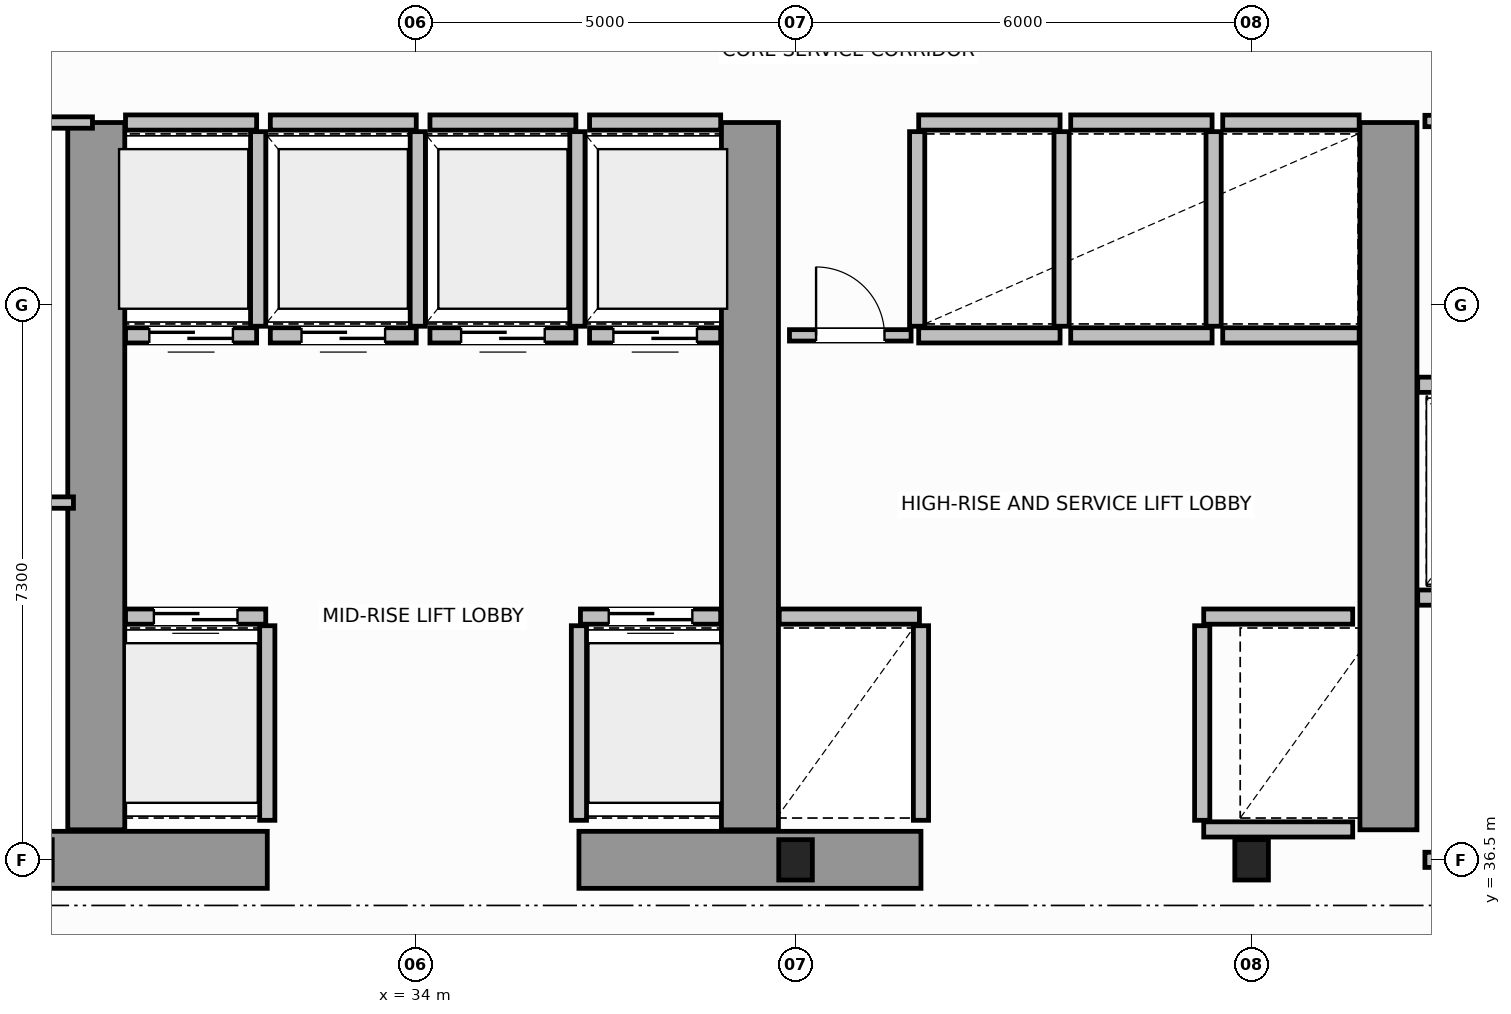
"""IFC4 building model, lengths in metres.
Left out: names, types, materials, properties, quantities, classifications, styles, units other than length and angle.
Written with IfcOpenShell. Run it as: python <this file> out.ifc"""

import sys

from ifc_helpers import new_model, si_unit, direction, frame, frame_2d, origin, origin_2d, place, context, subcontext, project, spatial, rectangle, i_section, extrude, source, transform, mapped, element, fill, save


model = new_model("IFC4")
c1 = context("Model", 3, precision=1e-05, world=origin(), true_north=direction((0.0, 1.0)))
c2 = subcontext(c1, "Body", "Model", "MODEL_VIEW")
j1 = project(units=[si_unit("LENGTHUNIT", "METRE"), si_unit("PLANEANGLEUNIT", "RADIAN")], contexts=[c1])
p1 = place(None, origin())
s1 = spatial("IfcSite", under=j1, at=p1, CompositionType="ELEMENT")
p2 = place(p1, origin())
s2 = spatial("IfcBuilding", under=s1, at=p2, CompositionType="ELEMENT")
p3 = place(p2, frame((0.0, 0.0, 118.6)))
s3 = spatial("IfcBuildingStorey", under=s2, at=p3, CompositionType="ELEMENT", Elevation=118.6)
m1 = source(origin(), c2, "Body", "SweptSolid", [
    extrude(i_section(OverallWidth=0.442, OverallDepth=0.531, WebThickness=0.065, FlangeThickness=0.076, FilletRadius=0.015, at=origin_2d()), origin(), (0.0, 0.0, 1.0), 3.8),
])
for number, where, z_axis, x_axis in (
    (1, (39.0, 36.5, 0.0), (0.0, 0.0, 1.0), (1.0, 0.0, 0.0)),
    (2, (45.0, 36.5, 0.0), (0.0, 0.0, 1.0), (1.0, 0.0, 0.0)),
):
    element("IfcColumn", number, at=place(p3, frame(where, z_axis=z_axis, x_axis=x_axis)), inside=s3, PredefinedType="COLUMN", context=c2, shape_type="MappedRepresentation", body=[
        mapped(m1, transform((0.0, 0.0, 0.0), scale=1.0)),
    ])
for number, where, z_axis, x_axis in (
    (3, (27.55, 36.5, 0.0), (0.0, 0.0, 1.0), (1.0, 0.0, 0.0)),
    (4, (36.15, 36.5, 0.0), (0.0, 0.0, 1.0), (1.0, 0.0, 0.0)),
):
    element("IfcWall", number, at=place(p3, frame(where, z_axis=z_axis, x_axis=x_axis)), inside=s3, PredefinedType="SHEAR", context=c2, shape_type="SweptSolid", body=[
        extrude(rectangle(XDim=4.5, YDim=0.75, at=frame_2d((2.25, 0.0))), origin(), (0.0, 0.0, 1.0), 3.8),
    ])
for number, where, z_axis, x_axis in (
    (5, (29.8, 36.895, 0.0), (0.0, 0.0, 1.0), (0.0, 1.0, 0.0)),
    (6, (38.4, 36.895, 0.0), (0.0, 0.0, 1.0), (0.0, 1.0, 0.0)),
    (7, (46.8, 36.895, 0.0), (0.0, 0.0, 1.0), (0.0, 1.0, 0.0)),
):
    element("IfcWall", number, at=place(p3, frame(where, z_axis=z_axis, x_axis=x_axis)), inside=s3, PredefinedType="SHEAR", context=c2, shape_type="SweptSolid", body=[
        extrude(rectangle(XDim=9.305, YDim=0.75, at=frame_2d((4.652, 0.0))), origin(), (0.0, 0.0, 1.0), 3.8),
    ])
p4 = place(p3, frame((47.28, 36.5, 0.0), z_axis=(0.0, 0.0, 1.0), x_axis=(1.0, 0.0, 0.0)))
e8 = element("IfcWall", 8, at=p4, inside=s3, PredefinedType="SOLIDWALL", context=c2, shape_type="SweptSolid", body=[
    extrude(rectangle(XDim=2.47, YDim=0.2, at=frame_2d((1.235, 0.0))), origin(), (0.0, 0.0, 1.0), 2.37),
])
p5 = place(p4, frame((0.65, 0.0, 0.0)))
e9 = element("IfcOpeningElement", 9, at=p5, cuts=e8, PredefinedType="OPENING", context=c2, shape_type="SweptSolid", body=[
    extrude(rectangle(XDim=1.1, YDim=2.15, at=frame_2d((0.55, 1.075))), frame((0.0, 0.11, 0.0), z_axis=(0.0, -1.0, 0.0), x_axis=(1.0, 0.0, 0.0)), (0.0, 0.0, 1.0), 0.22),
])
p6 = place(p3, frame((30.185, 39.7, 0.0), z_axis=(0.0, 0.0, 1.0), x_axis=(1.0, 0.0, 0.0)))
e10 = element("IfcWall", 10, at=p6, inside=s3, PredefinedType="SOLIDWALL", context=c2, shape_type="SweptSolid", body=[
    extrude(rectangle(XDim=1.845, YDim=0.2, at=frame_2d((0.922, 0.0))), origin(), (0.0, 0.0, 1.0), 3.58),
])
p7 = place(p6, frame((0.373, 0.0, 0.0)))
e11 = element("IfcOpeningElement", 11, at=p7, cuts=e10, PredefinedType="OPENING", context=c2, shape_type="SweptSolid", body=[
    extrude(rectangle(XDim=1.1, YDim=2.15, at=frame_2d((0.55, 1.075))), frame((0.0, 0.11, 0.0), z_axis=(0.0, -1.0, 0.0), x_axis=(1.0, 0.0, 0.0)), (0.0, 0.0, 1.0), 0.22),
])
p8 = place(p3, frame((32.05, 37.02, 0.0), z_axis=(0.0, 0.0, 1.0), x_axis=(0.0, 1.0, 0.0)))
e12 = element("IfcWall", 12, at=p8, inside=s3, PredefinedType="SOLIDWALL", context=c2, shape_type="SweptSolid", body=[
    extrude(rectangle(XDim=2.56, YDim=0.2, at=frame_2d((1.28, 0.0))), origin(), (0.0, 0.0, 1.0), 3.58),
])
p9 = place(p3, frame((36.17, 39.7, 0.0), z_axis=(0.0, 0.0, 1.0), x_axis=(1.0, 0.0, 0.0)))
e13 = element("IfcWall", 13, at=p9, inside=s3, PredefinedType="SOLIDWALL", context=c2, shape_type="SweptSolid", body=[
    extrude(rectangle(XDim=1.845, YDim=0.2, at=frame_2d((0.922, 0.0))), origin(), (0.0, 0.0, 1.0), 3.58),
])
p10 = place(p9, frame((0.372, 0.0, 0.0)))
e14 = element("IfcOpeningElement", 14, at=p10, cuts=e13, PredefinedType="OPENING", context=c2, shape_type="SweptSolid", body=[
    extrude(rectangle(XDim=1.1, YDim=2.15, at=frame_2d((0.55, 1.075))), frame((0.0, 0.11, 0.0), z_axis=(0.0, -1.0, 0.0), x_axis=(1.0, 0.0, 0.0)), (0.0, 0.0, 1.0), 0.22),
])
p11 = place(p3, frame((36.15, 37.02, 0.0), z_axis=(0.0, 0.0, 1.0), x_axis=(0.0, 1.0, 0.0)))
e15 = element("IfcWall", 15, at=p11, inside=s3, PredefinedType="SOLIDWALL", context=c2, shape_type="SweptSolid", body=[
    extrude(rectangle(XDim=2.56, YDim=0.2, at=frame_2d((1.28, 0.0))), origin(), (0.0, 0.0, 1.0), 3.58),
])
p12 = place(p3, frame((30.185, 43.4, 0.0), z_axis=(0.0, 0.0, 1.0), x_axis=(1.0, 0.0, 0.0)))
e16 = element("IfcWall", 16, at=p12, inside=s3, PredefinedType="SOLIDWALL", context=c2, shape_type="SweptSolid", body=[
    extrude(rectangle(XDim=1.725, YDim=0.2, at=frame_2d((0.862, 0.0))), origin(), (0.0, 0.0, 1.0), 3.58),
])
p13 = place(p12, frame((0.313, 0.0, 0.0)))
e17 = element("IfcOpeningElement", 17, at=p13, cuts=e16, PredefinedType="OPENING", context=c2, shape_type="SweptSolid", body=[
    extrude(rectangle(XDim=1.1, YDim=2.15, at=frame_2d((0.55, 1.075))), frame((0.0, 0.11, 0.0), z_axis=(0.0, -1.0, 0.0), x_axis=(1.0, 0.0, 0.0)), (0.0, 0.0, 1.0), 0.22),
])
p14 = place(p3, frame((30.185, 46.2, 0.0), z_axis=(0.0, 0.0, 1.0), x_axis=(1.0, 0.0, 0.0)))
e18 = element("IfcWall", 18, at=p14, inside=s3, PredefinedType="SOLIDWALL", context=c2, shape_type="SweptSolid", body=[
    extrude(rectangle(XDim=1.725, YDim=0.2, at=frame_2d((0.862, 0.0))), origin(), (0.0, 0.0, 1.0), 3.58),
])
p15 = place(p3, frame((31.93, 43.52, 0.0), z_axis=(0.0, 0.0, 1.0), x_axis=(0.0, 1.0, 0.0)))
e19 = element("IfcWall", 19, at=p15, inside=s3, PredefinedType="SOLIDWALL", context=c2, shape_type="SweptSolid", body=[
    extrude(rectangle(XDim=2.56, YDim=0.2, at=frame_2d((1.28, 0.0))), origin(), (0.0, 0.0, 1.0), 3.58),
])
p16 = place(p3, frame((32.09, 43.4, 0.0), z_axis=(0.0, 0.0, 1.0), x_axis=(1.0, 0.0, 0.0)))
e20 = element("IfcWall", 20, at=p16, inside=s3, PredefinedType="SOLIDWALL", context=c2, shape_type="SweptSolid", body=[
    extrude(rectangle(XDim=1.92, YDim=0.2, at=frame_2d((0.96, 0.0))), origin(), (0.0, 0.0, 1.0), 3.58),
])
p17 = place(p16, frame((0.41, 0.0, 0.0)))
e21 = element("IfcOpeningElement", 21, at=p17, cuts=e20, PredefinedType="OPENING", context=c2, shape_type="SweptSolid", body=[
    extrude(rectangle(XDim=1.1, YDim=2.15, at=frame_2d((0.55, 1.075))), frame((0.0, 0.11, 0.0), z_axis=(0.0, -1.0, 0.0), x_axis=(1.0, 0.0, 0.0)), (0.0, 0.0, 1.0), 0.22),
])
p18 = place(p3, frame((32.09, 46.2, 0.0), z_axis=(0.0, 0.0, 1.0), x_axis=(1.0, 0.0, 0.0)))
e22 = element("IfcWall", 22, at=p18, inside=s3, PredefinedType="SOLIDWALL", context=c2, shape_type="SweptSolid", body=[
    extrude(rectangle(XDim=1.92, YDim=0.2, at=frame_2d((0.96, 0.0))), origin(), (0.0, 0.0, 1.0), 3.58),
])
p19 = place(p3, frame((34.03, 43.52, 0.0), z_axis=(0.0, 0.0, 1.0), x_axis=(0.0, 1.0, 0.0)))
e23 = element("IfcWall", 23, at=p19, inside=s3, PredefinedType="SOLIDWALL", context=c2, shape_type="SweptSolid", body=[
    extrude(rectangle(XDim=2.56, YDim=0.2, at=frame_2d((1.28, 0.0))), origin(), (0.0, 0.0, 1.0), 3.58),
])
p20 = place(p3, frame((34.19, 43.4, 0.0), z_axis=(0.0, 0.0, 1.0), x_axis=(1.0, 0.0, 0.0)))
e24 = element("IfcWall", 24, at=p20, inside=s3, PredefinedType="SOLIDWALL", context=c2, shape_type="SweptSolid", body=[
    extrude(rectangle(XDim=1.92, YDim=0.2, at=frame_2d((0.96, 0.0))), origin(), (0.0, 0.0, 1.0), 3.58),
])
p21 = place(p20, frame((0.41, 0.0, 0.0)))
e25 = element("IfcOpeningElement", 25, at=p21, cuts=e24, PredefinedType="OPENING", context=c2, shape_type="SweptSolid", body=[
    extrude(rectangle(XDim=1.1, YDim=2.15, at=frame_2d((0.55, 1.075))), frame((0.0, 0.11, 0.0), z_axis=(0.0, -1.0, 0.0), x_axis=(1.0, 0.0, 0.0)), (0.0, 0.0, 1.0), 0.22),
])
p22 = place(p3, frame((34.19, 46.2, 0.0), z_axis=(0.0, 0.0, 1.0), x_axis=(1.0, 0.0, 0.0)))
e26 = element("IfcWall", 26, at=p22, inside=s3, PredefinedType="SOLIDWALL", context=c2, shape_type="SweptSolid", body=[
    extrude(rectangle(XDim=1.92, YDim=0.2, at=frame_2d((0.96, 0.0))), origin(), (0.0, 0.0, 1.0), 3.58),
])
p23 = place(p3, frame((36.13, 43.52, 0.0), z_axis=(0.0, 0.0, 1.0), x_axis=(0.0, 1.0, 0.0)))
e27 = element("IfcWall", 27, at=p23, inside=s3, PredefinedType="SOLIDWALL", context=c2, shape_type="SweptSolid", body=[
    extrude(rectangle(XDim=2.56, YDim=0.2, at=frame_2d((1.28, 0.0))), origin(), (0.0, 0.0, 1.0), 3.58),
])
p24 = place(p3, frame((36.29, 43.4, 0.0), z_axis=(0.0, 0.0, 1.0), x_axis=(1.0, 0.0, 0.0)))
e28 = element("IfcWall", 28, at=p24, inside=s3, PredefinedType="SOLIDWALL", context=c2, shape_type="SweptSolid", body=[
    extrude(rectangle(XDim=1.725, YDim=0.2, at=frame_2d((0.862, 0.0))), origin(), (0.0, 0.0, 1.0), 3.58),
])
p25 = place(p24, frame((0.313, 0.0, 0.0)))
e29 = element("IfcOpeningElement", 29, at=p25, cuts=e28, PredefinedType="OPENING", context=c2, shape_type="SweptSolid", body=[
    extrude(rectangle(XDim=1.1, YDim=2.15, at=frame_2d((0.55, 1.075))), frame((0.0, 0.11, 0.0), z_axis=(0.0, -1.0, 0.0), x_axis=(1.0, 0.0, 0.0)), (0.0, 0.0, 1.0), 0.22),
])
p26 = place(p3, frame((36.29, 46.2, 0.0), z_axis=(0.0, 0.0, 1.0), x_axis=(1.0, 0.0, 0.0)))
e30 = element("IfcWall", 30, at=p26, inside=s3, PredefinedType="SOLIDWALL", context=c2, shape_type="SweptSolid", body=[
    extrude(rectangle(XDim=1.725, YDim=0.2, at=frame_2d((0.862, 0.0))), origin(), (0.0, 0.0, 1.0), 3.58),
])
p27 = place(p3, frame((38.785, 39.7, 0.0), z_axis=(0.0, 0.0, 1.0), x_axis=(1.0, 0.0, 0.0)))
e31 = element("IfcWall", 31, at=p27, inside=s3, PredefinedType="SOLIDWALL", context=c2, shape_type="SweptSolid", body=[
    extrude(rectangle(XDim=1.845, YDim=0.2, at=frame_2d((0.922, 0.0))), origin(), (0.0, 0.0, 1.0), 3.58),
])
p28 = place(p3, frame((40.65, 37.02, 0.0), z_axis=(0.0, 0.0, 1.0), x_axis=(0.0, 1.0, 0.0)))
e32 = element("IfcWall", 32, at=p28, inside=s3, PredefinedType="SOLIDWALL", context=c2, shape_type="SweptSolid", body=[
    extrude(rectangle(XDim=2.56, YDim=0.2, at=frame_2d((1.28, 0.0))), origin(), (0.0, 0.0, 1.0), 3.58),
])
p29 = place(p3, frame((44.37, 39.7, 0.0), z_axis=(0.0, 0.0, 1.0), x_axis=(1.0, 0.0, 0.0)))
e33 = element("IfcWall", 33, at=p29, inside=s3, PredefinedType="SOLIDWALL", context=c2, shape_type="SweptSolid", body=[
    extrude(rectangle(XDim=1.96, YDim=0.2, at=frame_2d((0.98, 0.0))), origin(), (0.0, 0.0, 1.0), 3.58),
])
p30 = place(p3, frame((44.37, 36.9, 0.0), z_axis=(0.0, 0.0, 1.0), x_axis=(1.0, 0.0, 0.0)))
e34 = element("IfcWall", 34, at=p30, inside=s3, PredefinedType="SOLIDWALL", context=c2, shape_type="SweptSolid", body=[
    extrude(rectangle(XDim=1.96, YDim=0.2, at=frame_2d((0.98, 0.0))), origin(), (0.0, 0.0, 1.0), 2.37),
])
p31 = place(p3, frame((44.35, 37.02, 0.0), z_axis=(0.0, 0.0, 1.0), x_axis=(0.0, 1.0, 0.0)))
e35 = element("IfcWall", 35, at=p31, inside=s3, PredefinedType="SOLIDWALL", context=c2, shape_type="SweptSolid", body=[
    extrude(rectangle(XDim=2.56, YDim=0.2, at=frame_2d((1.28, 0.0))), origin(), (0.0, 0.0, 1.0), 3.58),
])
for number, where, z_axis, x_axis in (
    (36, (40.62, 43.4, 0.0), (0.0, 0.0, 1.0), (1.0, 0.0, 0.0)),
    (37, (40.62, 46.2, 0.0), (0.0, 0.0, 1.0), (1.0, 0.0, 0.0)),
):
    element("IfcWall", number, at=place(p3, frame(where, z_axis=z_axis, x_axis=x_axis)), inside=s3, PredefinedType="SOLIDWALL", context=c2, shape_type="SweptSolid", body=[
        extrude(rectangle(XDim=1.86, YDim=0.2, at=frame_2d((0.93, 0.0))), origin(), (0.0, 0.0, 1.0), 3.58),
    ])
for number, where, z_axis, x_axis in (
    (38, (40.6, 43.52, 0.0), (0.0, 0.0, 1.0), (0.0, 1.0, 0.0)),
    (39, (42.5, 43.52, 0.0), (0.0, 0.0, 1.0), (0.0, 1.0, 0.0)),
):
    element("IfcWall", number, at=place(p3, frame(where, z_axis=z_axis, x_axis=x_axis)), inside=s3, PredefinedType="SOLIDWALL", context=c2, shape_type="SweptSolid", body=[
        extrude(rectangle(XDim=2.56, YDim=0.2, at=frame_2d((1.28, 0.0))), origin(), (0.0, 0.0, 1.0), 3.58),
    ])
for number, where, z_axis, x_axis in (
    (40, (42.62, 43.4, 0.0), (0.0, 0.0, 1.0), (1.0, 0.0, 0.0)),
    (41, (42.62, 46.2, 0.0), (0.0, 0.0, 1.0), (1.0, 0.0, 0.0)),
):
    element("IfcWall", number, at=place(p3, frame(where, z_axis=z_axis, x_axis=x_axis)), inside=s3, PredefinedType="SOLIDWALL", context=c2, shape_type="SweptSolid", body=[
        extrude(rectangle(XDim=1.86, YDim=0.2, at=frame_2d((0.93, 0.0))), origin(), (0.0, 0.0, 1.0), 3.58),
    ])
p32 = place(p3, frame((44.5, 43.52, 0.0), z_axis=(0.0, 0.0, 1.0), x_axis=(0.0, 1.0, 0.0)))
e42 = element("IfcWall", 42, at=p32, inside=s3, PredefinedType="SOLIDWALL", context=c2, shape_type="SweptSolid", body=[
    extrude(rectangle(XDim=2.56, YDim=0.2, at=frame_2d((1.28, 0.0))), origin(), (0.0, 0.0, 1.0), 3.58),
])
for number, where, z_axis, x_axis in (
    (43, (44.62, 43.4, 0.0), (0.0, 0.0, 1.0), (1.0, 0.0, 0.0)),
    (44, (44.62, 46.2, 0.0), (0.0, 0.0, 1.0), (1.0, 0.0, 0.0)),
):
    element("IfcWall", number, at=place(p3, frame(where, z_axis=z_axis, x_axis=x_axis)), inside=s3, PredefinedType="SOLIDWALL", context=c2, shape_type="SweptSolid", body=[
        extrude(rectangle(XDim=1.795, YDim=0.2, at=frame_2d((0.897, 0.0))), origin(), (0.0, 0.0, 1.0), 3.58),
    ])
p33 = place(p3, frame((47.185, 39.95, 0.0), z_axis=(0.0, 0.0, 1.0), x_axis=(1.0, 0.0, 0.0)))
e45 = element("IfcWall", 45, at=p33, inside=s3, PredefinedType="SOLIDWALL", context=c2, shape_type="SweptSolid", body=[
    extrude(rectangle(XDim=2.145, YDim=0.2, at=frame_2d((1.073, 0.0))), origin(), (0.0, 0.0, 1.0), 3.58),
])
p34 = place(p33, frame((0.522, 0.0, 0.0)))
e46 = element("IfcOpeningElement", 46, at=p34, cuts=e45, PredefinedType="OPENING", context=c2, shape_type="SweptSolid", body=[
    extrude(rectangle(XDim=1.1, YDim=2.15, at=frame_2d((0.55, 1.075))), frame((0.0, 0.11, 0.0), z_axis=(0.0, -1.0, 0.0), x_axis=(1.0, 0.0, 0.0)), (0.0, 0.0, 1.0), 0.22),
])
p35 = place(p3, frame((47.185, 42.75, 0.0), z_axis=(0.0, 0.0, 1.0), x_axis=(1.0, 0.0, 0.0)))
e47 = element("IfcWall", 47, at=p35, inside=s3, PredefinedType="SOLIDWALL", context=c2, shape_type="SweptSolid", body=[
    extrude(rectangle(XDim=2.145, YDim=0.2, at=frame_2d((1.073, 0.0))), origin(), (0.0, 0.0, 1.0), 3.58),
])
p36 = place(p3, frame((21.25, 46.2, 0.0), z_axis=(0.0, 0.0, 1.0), x_axis=(1.0, 0.0, 0.0)))
e48 = element("IfcWall", 48, at=p36, inside=s3, PredefinedType="PARTITIONING", context=c2, shape_type="SweptSolid", body=[
    extrude(rectangle(XDim=8.5, YDim=0.15, at=frame_2d((4.25, 0.0))), origin(), (0.0, 0.0, 1.0), 3.58),
])
p37 = place(p3, frame((21.5, 41.2, 0.0), z_axis=(0.0, 0.0, 1.0), x_axis=(1.0, 0.0, 0.0)))
e49 = element("IfcWall", 49, at=p37, inside=s3, PredefinedType="PARTITIONING", context=c2, shape_type="SweptSolid", body=[
    extrude(rectangle(XDim=8.0, YDim=0.15, at=frame_2d((4.0, 0.0))), origin(), (0.0, 0.0, 1.0), 3.58),
])
p38 = place(p37, frame((3.4, 0.0, 0.0)))
e50 = element("IfcOpeningElement", 50, at=p38, cuts=e49, PredefinedType="OPENING", context=c2, shape_type="SweptSolid", body=[
    extrude(rectangle(XDim=0.9, YDim=2.1, at=frame_2d((0.45, 1.05))), frame((0.0, 0.085, 0.0), z_axis=(0.0, -1.0, 0.0), x_axis=(1.0, 0.0, 0.0)), (0.0, 0.0, 1.0), 0.17),
])
p39 = place(p3, frame((47.28, 46.22, 0.0), z_axis=(0.0, 0.0, 1.0), x_axis=(1.0, 0.0, 0.0)))
e51 = element("IfcWall", 51, at=p39, inside=s3, PredefinedType="PARTITIONING", context=c2, shape_type="SweptSolid", body=[
    extrude(rectangle(XDim=2.1, YDim=0.15, at=frame_2d((1.05, 0.0))), origin(), (0.0, 0.0, 1.0), 3.58),
])
p40 = place(p39, frame((0.55, 0.0, 0.0)))
e52 = element("IfcOpeningElement", 52, at=p40, cuts=e51, PredefinedType="OPENING", context=c2, shape_type="SweptSolid", body=[
    extrude(rectangle(XDim=0.9, YDim=2.1, at=frame_2d((0.45, 1.05))), frame((0.0, 0.085, 0.0), z_axis=(0.0, -1.0, 0.0), x_axis=(1.0, 0.0, 0.0)), (0.0, 0.0, 1.0), 0.17),
])
p41 = place(p3, frame((38.92, 43.4, 0.0), z_axis=(0.0, 0.0, 1.0), x_axis=(1.0, 0.0, 0.0)))
e53 = element("IfcWall", 53, at=p41, inside=s3, PredefinedType="PARTITIONING", context=c2, shape_type="SweptSolid", body=[
    extrude(rectangle(XDim=1.6, YDim=0.15, at=frame_2d((0.8, 0.0))), origin(), (0.0, 0.0, 1.0), 3.58),
])
p42 = place(p41, frame((0.35, 0.0, 0.0)))
e54 = element("IfcOpeningElement", 54, at=p42, cuts=e53, PredefinedType="OPENING", context=c2, shape_type="SweptSolid", body=[
    extrude(rectangle(XDim=0.9, YDim=2.1, at=frame_2d((0.45, 1.05))), frame((0.0, 0.085, 0.0), z_axis=(0.0, -1.0, 0.0), x_axis=(1.0, 0.0, 0.0)), (0.0, 0.0, 1.0), 0.17),
])
m2 = source(origin(), c2, "Body", "SweptSolid", [
    extrude(rectangle(XDim=1.1, YDim=2.15, at=frame_2d((0.55, 1.075))), frame((0.0, 0.025, 0.0), z_axis=(0.0, -1.0, 0.0), x_axis=(1.0, 0.0, 0.0)), (0.0, 0.0, 1.0), 0.05),
])
p43 = place(p7, origin())
e55 = element("IfcDoor", 55, at=p43, inside=s3, OperationType="DOUBLE_DOOR_SLIDING", PredefinedType="DOOR", context=c2, shape_type="MappedRepresentation", body=[
    mapped(m2, transform((0.0, 0.0, 0.0), scale=1.0)),
])
fill(e11, e55)
p44 = place(p10, origin())
e56 = element("IfcDoor", 56, at=p44, inside=s3, OperationType="DOUBLE_DOOR_SLIDING", PredefinedType="DOOR", context=c2, shape_type="MappedRepresentation", body=[
    mapped(m2, transform((0.0, 0.0, 0.0), scale=1.0)),
])
fill(e14, e56)
p45 = place(p13, origin())
e57 = element("IfcDoor", 57, at=p45, inside=s3, OperationType="DOUBLE_DOOR_SLIDING", PredefinedType="DOOR", context=c2, shape_type="MappedRepresentation", body=[
    mapped(m2, transform((0.0, 0.0, 0.0), scale=1.0)),
])
fill(e17, e57)
p46 = place(p17, origin())
e58 = element("IfcDoor", 58, at=p46, inside=s3, OperationType="DOUBLE_DOOR_SLIDING", PredefinedType="DOOR", context=c2, shape_type="MappedRepresentation", body=[
    mapped(m2, transform((0.0, 0.0, 0.0), scale=1.0)),
])
fill(e21, e58)
p47 = place(p21, origin())
e59 = element("IfcDoor", 59, at=p47, inside=s3, OperationType="DOUBLE_DOOR_SLIDING", PredefinedType="DOOR", context=c2, shape_type="MappedRepresentation", body=[
    mapped(m2, transform((0.0, 0.0, 0.0), scale=1.0)),
])
fill(e25, e59)
p48 = place(p25, origin())
e60 = element("IfcDoor", 60, at=p48, inside=s3, OperationType="DOUBLE_DOOR_SLIDING", PredefinedType="DOOR", context=c2, shape_type="MappedRepresentation", body=[
    mapped(m2, transform((0.0, 0.0, 0.0), scale=1.0)),
])
fill(e29, e60)
m3 = source(origin(), c2, "Body", "SweptSolid", [
    extrude(rectangle(XDim=0.9, YDim=2.1, at=frame_2d((0.45, 1.05))), frame((0.0, 0.025, 0.0), z_axis=(0.0, -1.0, 0.0), x_axis=(1.0, 0.0, 0.0)), (0.0, 0.0, 1.0), 0.05),
])
p49 = place(p42, origin())
e61 = element("IfcDoor", 61, at=p49, inside=s3, OperationType="SINGLE_SWING_LEFT", PredefinedType="DOOR", context=c2, shape_type="MappedRepresentation", body=[
    mapped(m3, transform((0.0, 0.0, 0.0), scale=1.0)),
])
fill(e54, e61)
save(model, sys.argv[1])
